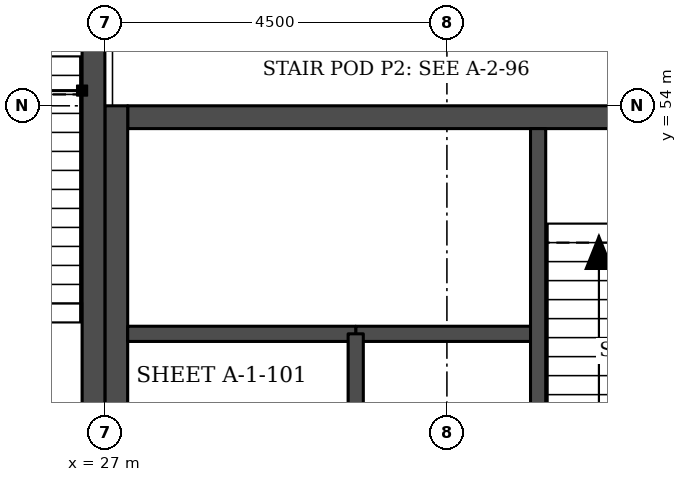
"""IFC4 building model, lengths in metres.
Left out: names, types, materials, properties, quantities, classifications, styles, units other than length and angle.
Written with IfcOpenShell. Run it as: python <this file> out.ifc"""

import sys

from ifc_helpers import new_model, si_unit, direction, frame, frame_2d, origin, place, context, subcontext, project, spatial, rectangle, extrude, element, save


model = new_model("IFC4")
c1 = context("Model", 3, precision=1e-05, world=origin(), true_north=direction((0.0, 1.0)))
c2 = subcontext(c1, "Body", "Model", "MODEL_VIEW")
j1 = project(units=[si_unit("LENGTHUNIT", "METRE"), si_unit("PLANEANGLEUNIT", "RADIAN")], contexts=[c1])
p1 = place(None, origin())
s1 = spatial("IfcSite", under=j1, at=p1, CompositionType="ELEMENT")
p2 = place(p1, origin())
s2 = spatial("IfcBuilding", under=s1, at=p2, CompositionType="ELEMENT")
p3 = place(p2, frame((0.0, 0.0, 115.9)))
s3 = spatial("IfcBuildingStorey", under=s2, at=p3, CompositionType="ELEMENT", Elevation=115.9)
p4 = place(p3, frame((27.3, 53.85, 0.0), z_axis=(0.0, 0.0, 1.0), x_axis=(1.0, 0.0, 0.0)))
e1 = element("IfcWall", 1, at=p4, inside=s3, PredefinedType="SHEAR", context=c2, shape_type="SweptSolid", body=[
    extrude(rectangle(XDim=8.4, YDim=0.3, at=frame_2d((4.2, 0.0))), origin(), (0.0, 0.0, 1.0), 3.7),
])
p5 = place(p4, frame((6.4, 0.0, 0.0)))
e2 = element("IfcOpeningElement", 2, at=p5, cuts=e1, PredefinedType="OPENING", context=c2, shape_type="SweptSolid", body=[
    extrude(rectangle(XDim=1.1, YDim=2.1, at=frame_2d((0.55, 1.05))), frame((0.0, 0.16, 0.0), z_axis=(0.0, -1.0, 0.0), x_axis=(1.0, 0.0, 0.0)), (0.0, 0.0, 1.0), 0.32),
])
p6 = place(p3, frame((27.15, 45.0, 0.0), z_axis=(0.0, 0.0, 1.0), x_axis=(0.0, 1.0, 0.0)))
e3 = element("IfcWall", 3, at=p6, inside=s3, PredefinedType="SHEAR", context=c2, shape_type="SweptSolid", body=[
    extrude(rectangle(XDim=9.0, YDim=0.3, at=frame_2d((4.5, 0.0))), origin(), (0.0, 0.0, 1.0), 3.7),
])
p7 = place(p6, frame((0.4, 0.0, 0.0)))
e4 = element("IfcOpeningElement", 4, at=p7, cuts=e3, PredefinedType="OPENING", context=c2, shape_type="SweptSolid", body=[
    extrude(rectangle(XDim=1.1, YDim=2.1, at=frame_2d((0.55, 1.05))), frame((0.0, 0.16, 0.0), z_axis=(0.0, -1.0, 0.0), x_axis=(1.0, 0.0, 0.0)), (0.0, 0.0, 1.0), 0.32),
])
p8 = place(p3, frame((26.85, 49.5, 0.0), z_axis=(0.0, 0.0, 1.0), x_axis=(0.0, 1.0, 0.0)))
e5 = element("IfcWall", 5, at=p8, inside=s3, PredefinedType="SHEAR", context=c2, shape_type="SweptSolid", body=[
    extrude(rectangle(XDim=9.0, YDim=0.3, at=frame_2d((4.5, 0.0))), origin(), (0.0, 0.0, 1.0), 3.7),
])
p9 = place(p8, frame((6.6, 0.0, 0.0)))
e6 = element("IfcOpeningElement", 6, at=p9, cuts=e5, PredefinedType="OPENING", context=c2, shape_type="SweptSolid", body=[
    extrude(rectangle(XDim=1.8, YDim=2.1, at=frame_2d((0.9, 1.05))), frame((0.0, 0.16, 0.0), z_axis=(0.0, -1.0, 0.0), x_axis=(1.0, 0.0, 0.0)), (0.0, 0.0, 1.0), 0.32),
])
p10 = place(p3, frame((30.3, 51.0, 0.0), z_axis=(0.0, 0.0, 1.0), x_axis=(1.0, 0.0, 0.0)))
e7 = element("IfcWall", 7, at=p10, inside=s3, PredefinedType="SOLIDWALL", context=c2, shape_type="SweptSolid", body=[
    extrude(rectangle(XDim=2.4, YDim=0.2, at=frame_2d((1.2, 0.0))), origin(), (0.0, 0.0, 1.0), 3.7),
])
p11 = place(p3, frame((27.3, 51.0, 0.0), z_axis=(0.0, 0.0, 1.0), x_axis=(1.0, 0.0, 0.0)))
e8 = element("IfcWall", 8, at=p11, inside=s3, PredefinedType="SOLIDWALL", context=c2, shape_type="SweptSolid", body=[
    extrude(rectangle(XDim=3.0, YDim=0.2, at=frame_2d((1.5, 0.0))), origin(), (0.0, 0.0, 1.0), 3.55),
])
for number, where, z_axis, x_axis in (
    (9, (30.3, 45.3, 0.0), (0.0, 0.0, 1.0), (0.0, 1.0, 0.0)),
    (10, (32.7, 48.0, 0.0), (0.0, 0.0, 1.0), (0.0, 1.0, 0.0)),
):
    element("IfcWall", number, at=place(p3, frame(where, z_axis=z_axis, x_axis=x_axis)), inside=s3, PredefinedType="SOLIDWALL", context=c2, shape_type="SweptSolid", body=[
        extrude(rectangle(XDim=5.7, YDim=0.2, at=frame_2d((2.85, 0.0))), origin(), (0.0, 0.0, 1.0), 3.55),
    ])
save(model, sys.argv[1])
